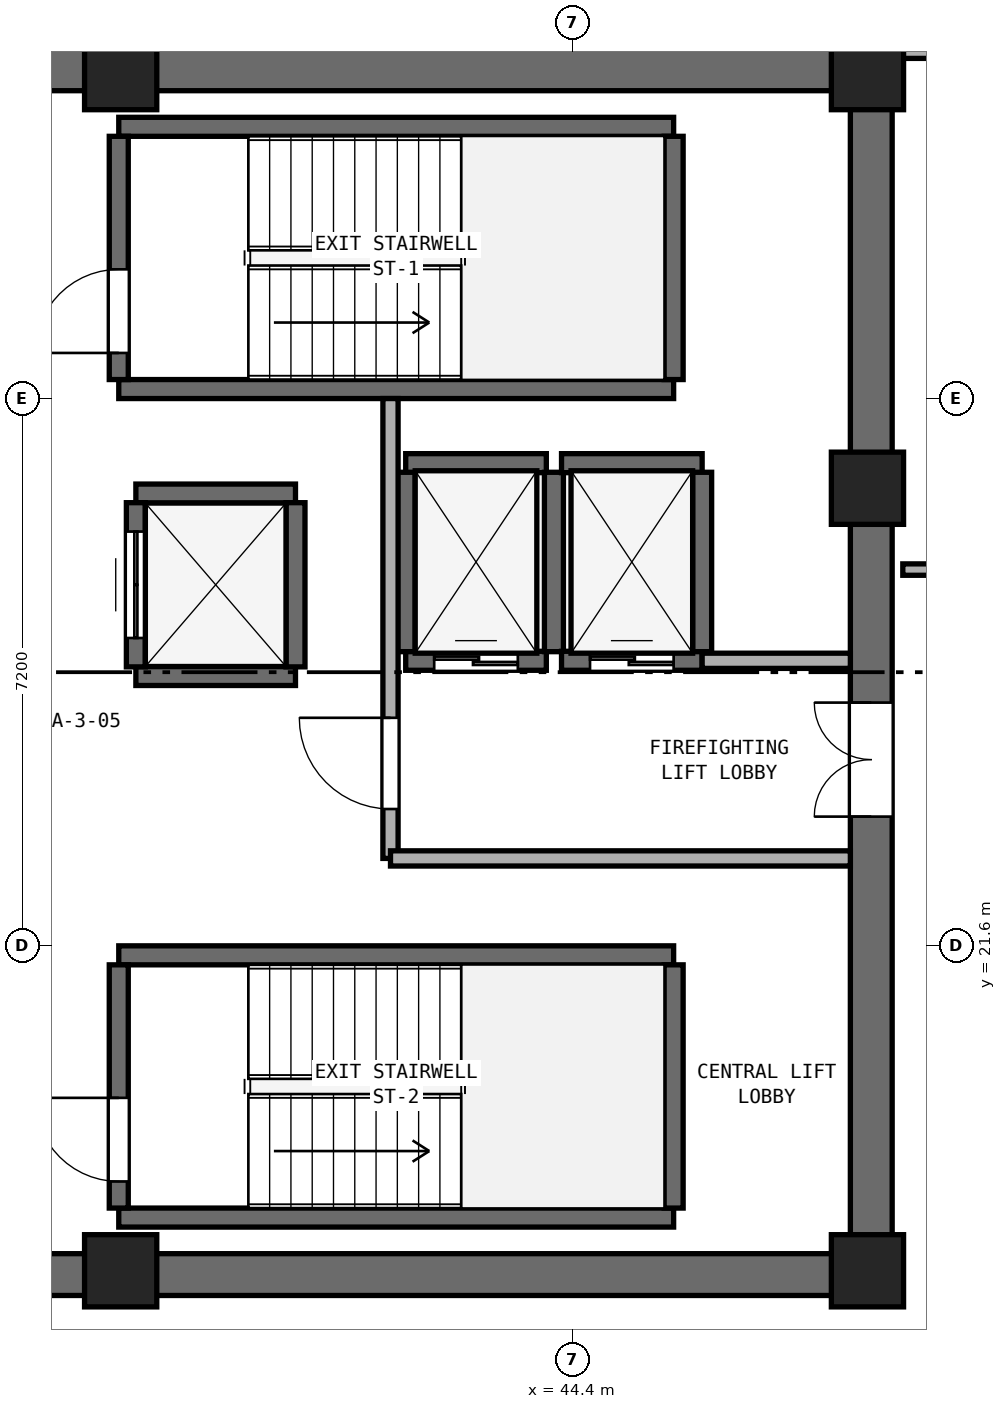
"""IFC4 building model, lengths in metres.
Left out: names, types, materials, properties, quantities, classifications, styles, units other than length and angle.
Written with IfcOpenShell. Run it as: python <this file> out.ifc"""

import sys

from ifc_helpers import new_model, si_unit, direction, frame, frame_2d, origin, origin_2d, place, context, subcontext, project, spatial, rectangle, extrude, element, fill, save


model = new_model("IFC4")
c1 = context("Model", 3, precision=1e-05, world=origin(), true_north=direction((0.0, 1.0)))
c2 = subcontext(c1, "Body", "Model", "MODEL_VIEW")
j1 = project(units=[si_unit("LENGTHUNIT", "METRE"), si_unit("PLANEANGLEUNIT", "RADIAN")], contexts=[c1])
p1 = place(None, origin())
s1 = spatial("IfcSite", under=j1, at=p1, CompositionType="ELEMENT")
p2 = place(p1, origin())
s2 = spatial("IfcBuilding", under=s1, at=p2, CompositionType="ELEMENT")
p3 = place(p2, frame((0.0, 0.0, 182.0)))
s3 = spatial("IfcBuildingStorey", under=s2, at=p3, CompositionType="ELEMENT", Elevation=182.0)
for number, where, z_axis, x_axis in (
    (1, (25.4, 17.275, 0.0), (0.0, 0.0, 1.0), (1.0, 0.0, 0.0)),
    (2, (25.4, 33.125, 0.0), (0.0, 0.0, 1.0), (1.0, 0.0, 0.0)),
):
    element("IfcWall", number, at=place(p3, frame(where, z_axis=z_axis, x_axis=x_axis)), inside=s3, PredefinedType="SHEAR", context=c2, shape_type="SweptSolid", body=[
        extrude(rectangle(XDim=23.2, YDim=0.55, at=frame_2d((11.6, 0.0))), origin(), (0.0, 0.0, 1.0), 3.54),
    ])
p4 = place(p3, frame((48.325, 17.55, 0.0), z_axis=(0.0, 0.0, 1.0), x_axis=(0.0, 1.0, 0.0)))
e3 = element("IfcWall", 3, at=p4, inside=s3, PredefinedType="SHEAR", context=c2, shape_type="SweptSolid", body=[
    extrude(rectangle(XDim=15.3, YDim=0.55, at=frame_2d((7.65, 0.0))), origin(), (0.0, 0.0, 1.0), 3.54),
])
p5 = place(p4, frame((5.75, 0.0, 0.0)))
e4 = element("IfcOpeningElement", 4, at=p5, cuts=e3, PredefinedType="OPENING", context=c2, shape_type="SweptSolid", body=[
    extrude(rectangle(XDim=1.5, YDim=2.15, at=frame_2d((0.75, 1.075))), frame((0.0, 0.285, 0.0), z_axis=(0.0, -1.0, 0.0), x_axis=(1.0, 0.0, 0.0)), (0.0, 0.0, 1.0), 0.57),
])
for number, where, z_axis, x_axis in (
    (5, (38.45, 17.325, 0.0), (0.0, 0.0, 1.0), (1.0, 0.0, 0.0)),
    (6, (48.275, 17.325, 0.0), (0.0, 0.0, 1.0), (1.0, 0.0, 0.0)),
    (7, (48.275, 27.62, 0.0), (0.0, 0.0, 1.0), (1.0, 0.0, 0.0)),
    (8, (48.275, 33.075, 0.0), (0.0, 0.0, 1.0), (1.0, 0.0, 0.0)),
    (9, (38.45, 33.075, 0.0), (0.0, 0.0, 1.0), (1.0, 0.0, 0.0)),
):
    element("IfcColumn", number, at=place(p3, frame(where, z_axis=z_axis, x_axis=x_axis)), inside=s3, PredefinedType="PILASTER", context=c2, shape_type="SweptSolid", body=[
        extrude(rectangle(XDim=0.95, YDim=0.95, at=origin_2d()), origin(), (0.0, 0.0, 1.0), 3.8),
    ])
for number, where, z_axis, x_axis in (
    (10, (38.425, 28.925, 0.0), (0.0, 0.0, 1.0), (1.0, 0.0, 0.0)),
    (11, (38.425, 32.375, 0.0), (0.0, 0.0, 1.0), (1.0, 0.0, 0.0)),
):
    element("IfcWall", number, at=place(p3, frame(where, z_axis=z_axis, x_axis=x_axis)), inside=s3, PredefinedType="SHEAR", context=c2, shape_type="SweptSolid", body=[
        extrude(rectangle(XDim=7.3, YDim=0.25, at=frame_2d((3.65, 0.0))), origin(), (0.0, 0.0, 1.0), 3.54),
    ])
p6 = place(p3, frame((38.425, 29.05, 0.0), z_axis=(0.0, 0.0, 1.0), x_axis=(0.0, 1.0, 0.0)))
e12 = element("IfcWall", 12, at=p6, inside=s3, PredefinedType="SHEAR", context=c2, shape_type="SweptSolid", body=[
    extrude(rectangle(XDim=3.2, YDim=0.25, at=frame_2d((1.6, 0.0))), origin(), (0.0, 0.0, 1.0), 3.54),
])
p7 = place(p6, frame((0.35, 0.0, 0.0)))
e13 = element("IfcOpeningElement", 13, at=p7, cuts=e12, PredefinedType="OPENING", context=c2, shape_type="SweptSolid", body=[
    extrude(rectangle(XDim=1.1, YDim=2.15, at=frame_2d((0.55, 1.075))), frame((0.0, 0.135, 0.0), z_axis=(0.0, -1.0, 0.0), x_axis=(1.0, 0.0, 0.0)), (0.0, 0.0, 1.0), 0.27),
])
p8 = place(p3, frame((45.725, 29.05, 0.0), z_axis=(0.0, 0.0, 1.0), x_axis=(0.0, 1.0, 0.0)))
e14 = element("IfcWall", 14, at=p8, inside=s3, PredefinedType="SHEAR", context=c2, shape_type="SweptSolid", body=[
    extrude(rectangle(XDim=3.2, YDim=0.25, at=frame_2d((1.6, 0.0))), origin(), (0.0, 0.0, 1.0), 3.54),
])
for number, where, z_axis, x_axis in (
    (15, (38.425, 18.025, 0.0), (0.0, 0.0, 1.0), (1.0, 0.0, 0.0)),
    (16, (38.425, 21.475, 0.0), (0.0, 0.0, 1.0), (1.0, 0.0, 0.0)),
):
    element("IfcWall", number, at=place(p3, frame(where, z_axis=z_axis, x_axis=x_axis)), inside=s3, PredefinedType="SHEAR", context=c2, shape_type="SweptSolid", body=[
        extrude(rectangle(XDim=7.3, YDim=0.25, at=frame_2d((3.65, 0.0))), origin(), (0.0, 0.0, 1.0), 3.54),
    ])
p9 = place(p3, frame((38.425, 18.15, 0.0), z_axis=(0.0, 0.0, 1.0), x_axis=(0.0, 1.0, 0.0)))
e17 = element("IfcWall", 17, at=p9, inside=s3, PredefinedType="SHEAR", context=c2, shape_type="SweptSolid", body=[
    extrude(rectangle(XDim=3.2, YDim=0.25, at=frame_2d((1.6, 0.0))), origin(), (0.0, 0.0, 1.0), 3.54),
])
p10 = place(p9, frame((0.35, 0.0, 0.0)))
e18 = element("IfcOpeningElement", 18, at=p10, cuts=e17, PredefinedType="OPENING", context=c2, shape_type="SweptSolid", body=[
    extrude(rectangle(XDim=1.1, YDim=2.15, at=frame_2d((0.55, 1.075))), frame((0.0, 0.135, 0.0), z_axis=(0.0, -1.0, 0.0), x_axis=(1.0, 0.0, 0.0)), (0.0, 0.0, 1.0), 0.27),
])
p11 = place(p3, frame((45.725, 18.15, 0.0), z_axis=(0.0, 0.0, 1.0), x_axis=(0.0, 1.0, 0.0)))
e19 = element("IfcWall", 19, at=p11, inside=s3, PredefinedType="SHEAR", context=c2, shape_type="SweptSolid", body=[
    extrude(rectangle(XDim=3.2, YDim=0.25, at=frame_2d((1.6, 0.0))), origin(), (0.0, 0.0, 1.0), 3.54),
])
p12 = place(p3, frame((42.2, 25.35, 0.0), z_axis=(0.0, 0.0, 1.0), x_axis=(1.0, 0.0, 0.0)))
e20 = element("IfcWall", 20, at=p12, inside=s3, PredefinedType="SHEAR", context=c2, shape_type="SweptSolid", body=[
    extrude(rectangle(XDim=1.85, YDim=0.25, at=frame_2d((0.925, 0.0))), origin(), (0.0, 0.0, 1.0), 3.54),
])
p13 = place(p12, frame((0.375, 0.0, 0.0)))
e21 = element("IfcOpeningElement", 21, at=p13, cuts=e20, PredefinedType="OPENING", context=c2, shape_type="SweptSolid", body=[
    extrude(rectangle(XDim=1.1, YDim=2.15, at=frame_2d((0.55, 1.075))), frame((0.0, 0.135, 0.0), z_axis=(0.0, -1.0, 0.0), x_axis=(1.0, 0.0, 0.0)), (0.0, 0.0, 1.0), 0.27),
])
p14 = place(p3, frame((42.2, 27.95, 0.0), z_axis=(0.0, 0.0, 1.0), x_axis=(1.0, 0.0, 0.0)))
e22 = element("IfcWall", 22, at=p14, inside=s3, PredefinedType="SHEAR", context=c2, shape_type="SweptSolid", body=[
    extrude(rectangle(XDim=1.85, YDim=0.25, at=frame_2d((0.925, 0.0))), origin(), (0.0, 0.0, 1.0), 3.54),
])
for number, where, z_axis, x_axis in (
    (23, (42.2, 25.47, 0.0), (0.0, 0.0, 1.0), (0.0, 1.0, 0.0)),
    (24, (44.15, 25.47, 0.0), (0.0, 0.0, 1.0), (0.0, 1.0, 0.0)),
):
    element("IfcWall", number, at=place(p3, frame(where, z_axis=z_axis, x_axis=x_axis)), inside=s3, PredefinedType="SHEAR", context=c2, shape_type="SweptSolid", body=[
        extrude(rectangle(XDim=2.36, YDim=0.25, at=frame_2d((1.18, 0.0))), origin(), (0.0, 0.0, 1.0), 3.54),
    ])
p15 = place(p3, frame((44.25, 25.35, 0.0), z_axis=(0.0, 0.0, 1.0), x_axis=(1.0, 0.0, 0.0)))
e25 = element("IfcWall", 25, at=p15, inside=s3, PredefinedType="SHEAR", context=c2, shape_type="SweptSolid", body=[
    extrude(rectangle(XDim=1.85, YDim=0.25, at=frame_2d((0.925, 0.0))), origin(), (0.0, 0.0, 1.0), 3.54),
])
p16 = place(p15, frame((0.375, 0.0, 0.0)))
e26 = element("IfcOpeningElement", 26, at=p16, cuts=e25, PredefinedType="OPENING", context=c2, shape_type="SweptSolid", body=[
    extrude(rectangle(XDim=1.1, YDim=2.15, at=frame_2d((0.55, 1.075))), frame((0.0, 0.135, 0.0), z_axis=(0.0, -1.0, 0.0), x_axis=(1.0, 0.0, 0.0)), (0.0, 0.0, 1.0), 0.27),
])
p17 = place(p3, frame((44.25, 27.95, 0.0), z_axis=(0.0, 0.0, 1.0), x_axis=(1.0, 0.0, 0.0)))
e27 = element("IfcWall", 27, at=p17, inside=s3, PredefinedType="SHEAR", context=c2, shape_type="SweptSolid", body=[
    extrude(rectangle(XDim=1.85, YDim=0.25, at=frame_2d((0.925, 0.0))), origin(), (0.0, 0.0, 1.0), 3.54),
])
p18 = place(p3, frame((46.1, 25.47, 0.0), z_axis=(0.0, 0.0, 1.0), x_axis=(0.0, 1.0, 0.0)))
e28 = element("IfcWall", 28, at=p18, inside=s3, PredefinedType="SHEAR", context=c2, shape_type="SweptSolid", body=[
    extrude(rectangle(XDim=2.36, YDim=0.25, at=frame_2d((1.18, 0.0))), origin(), (0.0, 0.0, 1.0), 3.54),
])
for number, where, z_axis, x_axis in (
    (29, (38.65, 25.15, 0.0), (0.0, 0.0, 1.0), (1.0, 0.0, 0.0)),
    (30, (38.65, 27.55, 0.0), (0.0, 0.0, 1.0), (1.0, 0.0, 0.0)),
):
    element("IfcWall", number, at=place(p3, frame(where, z_axis=z_axis, x_axis=x_axis)), inside=s3, PredefinedType="SHEAR", context=c2, shape_type="SweptSolid", body=[
        extrude(rectangle(XDim=2.1, YDim=0.25, at=frame_2d((1.05, 0.0))), origin(), (0.0, 0.0, 1.0), 3.54),
    ])
p19 = place(p3, frame((38.65, 25.27, 0.0), z_axis=(0.0, 0.0, 1.0), x_axis=(0.0, 1.0, 0.0)))
e31 = element("IfcWall", 31, at=p19, inside=s3, PredefinedType="SHEAR", context=c2, shape_type="SweptSolid", body=[
    extrude(rectangle(XDim=2.16, YDim=0.25, at=frame_2d((1.08, 0.0))), origin(), (0.0, 0.0, 1.0), 3.54),
])
p20 = place(p19, frame((0.38, 0.0, 0.0)))
e32 = element("IfcOpeningElement", 32, at=p20, cuts=e31, PredefinedType="OPENING", context=c2, shape_type="SweptSolid", body=[
    extrude(rectangle(XDim=1.4, YDim=2.2, at=frame_2d((0.7, 1.1))), frame((0.0, 0.135, 0.0), z_axis=(0.0, -1.0, 0.0), x_axis=(1.0, 0.0, 0.0)), (0.0, 0.0, 1.0), 0.27),
])
p21 = place(p3, frame((40.75, 25.27, 0.0), z_axis=(0.0, 0.0, 1.0), x_axis=(0.0, 1.0, 0.0)))
e33 = element("IfcWall", 33, at=p21, inside=s3, PredefinedType="SHEAR", context=c2, shape_type="SweptSolid", body=[
    extrude(rectangle(XDim=2.16, YDim=0.25, at=frame_2d((1.08, 0.0))), origin(), (0.0, 0.0, 1.0), 3.54),
])
p22 = place(p3, frame((42.0, 22.75, 0.0), z_axis=(0.0, 0.0, 1.0), x_axis=(0.0, 1.0, 0.0)))
e34 = element("IfcWall", 34, at=p22, inside=s3, PredefinedType="SOLIDWALL", context=c2, shape_type="SweptSolid", body=[
    extrude(rectangle(XDim=6.05, YDim=0.2, at=frame_2d((3.025, 0.0))), origin(), (0.0, 0.0, 1.0), 3.54),
])
p23 = place(p22, frame((0.65, 0.0, 0.0)))
e35 = element("IfcOpeningElement", 35, at=p23, cuts=e34, PredefinedType="OPENING", context=c2, shape_type="SweptSolid", body=[
    extrude(rectangle(XDim=1.2, YDim=2.15, at=frame_2d((0.6, 1.075))), frame((0.0, 0.11, 0.0), z_axis=(0.0, -1.0, 0.0), x_axis=(1.0, 0.0, 0.0)), (0.0, 0.0, 1.0), 0.22),
])
p24 = place(p3, frame((42.0, 22.75, 0.0), z_axis=(0.0, 0.0, 1.0), x_axis=(1.0, 0.0, 0.0)))
e36 = element("IfcWall", 36, at=p24, inside=s3, PredefinedType="SOLIDWALL", context=c2, shape_type="SweptSolid", body=[
    extrude(rectangle(XDim=6.05, YDim=0.2, at=frame_2d((3.025, 0.0))), origin(), (0.0, 0.0, 1.0), 3.54),
])
p25 = place(p3, frame((46.1, 25.35, 0.0), z_axis=(0.0, 0.0, 1.0), x_axis=(1.0, 0.0, 0.0)))
e37 = element("IfcWall", 37, at=p25, inside=s3, PredefinedType="SOLIDWALL", context=c2, shape_type="SweptSolid", body=[
    extrude(rectangle(XDim=1.95, YDim=0.2, at=frame_2d((0.975, 0.0))), origin(), (0.0, 0.0, 1.0), 3.54),
])
p26 = place(p3, frame((48.74, 26.55, 0.0), z_axis=(0.0, 0.0, 1.0), x_axis=(1.0, 0.0, 0.0)))
e38 = element("IfcWall", 38, at=p26, inside=s3, PredefinedType="PARTITIONING", context=c2, shape_type="SweptSolid", body=[
    extrude(rectangle(XDim=12.855, YDim=0.15, at=frame_2d((6.427, 0.0))), origin(), (0.0, 0.0, 1.0), 3.54),
])
p27 = place(p26, frame((5.927, 0.0, 0.0)))
e39 = element("IfcOpeningElement", 39, at=p27, cuts=e38, PredefinedType="OPENING", context=c2, shape_type="SweptSolid", body=[
    extrude(rectangle(XDim=1.0, YDim=2.12, at=frame_2d((0.5, 1.06))), frame((0.0, 0.085, 0.0), z_axis=(0.0, -1.0, 0.0), x_axis=(1.0, 0.0, 0.0)), (0.0, 0.0, 1.0), 0.17),
])
p28 = place(p3, frame((48.74, 33.35, 0.0), z_axis=(0.0, 0.0, 1.0), x_axis=(1.0, 0.0, 0.0)))
e40 = element("IfcWall", 40, at=p28, inside=s3, PredefinedType="PARTITIONING", context=c2, shape_type="SweptSolid", body=[
    extrude(rectangle(XDim=12.855, YDim=0.15, at=frame_2d((6.427, 0.0))), origin(), (0.0, 0.0, 1.0), 2.923),
])
p29 = place(p7, origin())
e41 = element("IfcDoor", 41, at=p29, inside=s3, OperationType="SINGLE_SWING_LEFT", PredefinedType="DOOR", context=c2, shape_type="SweptSolid", body=[
    extrude(rectangle(XDim=1.1, YDim=2.15, at=frame_2d((0.55, 1.075))), frame((0.0, 0.025, 0.0), z_axis=(0.0, -1.0, 0.0), x_axis=(1.0, 0.0, 0.0)), (0.0, 0.0, 1.0), 0.05),
])
fill(e13, e41)
p30 = place(p10, origin())
e42 = element("IfcDoor", 42, at=p30, inside=s3, OperationType="SINGLE_SWING_RIGHT", PredefinedType="DOOR", context=c2, shape_type="SweptSolid", body=[
    extrude(rectangle(XDim=1.1, YDim=2.15, at=frame_2d((0.55, 1.075))), frame((0.0, 0.025, 0.0), z_axis=(0.0, -1.0, 0.0), x_axis=(1.0, 0.0, 0.0)), (0.0, 0.0, 1.0), 0.05),
])
fill(e18, e42)
p31 = place(p13, origin())
e43 = element("IfcDoor", 43, at=p31, inside=s3, OperationType="DOUBLE_DOOR_SLIDING", PredefinedType="DOOR", context=c2, shape_type="SweptSolid", body=[
    extrude(rectangle(XDim=1.1, YDim=2.15, at=frame_2d((0.55, 1.075))), frame((0.0, 0.025, 0.0), z_axis=(0.0, -1.0, 0.0), x_axis=(1.0, 0.0, 0.0)), (0.0, 0.0, 1.0), 0.05),
])
fill(e21, e43)
p32 = place(p16, origin())
e44 = element("IfcDoor", 44, at=p32, inside=s3, OperationType="DOUBLE_DOOR_SLIDING", PredefinedType="DOOR", context=c2, shape_type="SweptSolid", body=[
    extrude(rectangle(XDim=1.1, YDim=2.15, at=frame_2d((0.55, 1.075))), frame((0.0, 0.025, 0.0), z_axis=(0.0, -1.0, 0.0), x_axis=(1.0, 0.0, 0.0)), (0.0, 0.0, 1.0), 0.05),
])
fill(e26, e44)
p33 = place(p20, origin())
e45 = element("IfcDoor", 45, at=p33, inside=s3, OperationType="DOUBLE_DOOR_SLIDING", PredefinedType="DOOR", context=c2, shape_type="SweptSolid", body=[
    extrude(rectangle(XDim=1.4, YDim=2.2, at=frame_2d((0.7, 1.1))), frame((0.0, 0.025, 0.0), z_axis=(0.0, -1.0, 0.0), x_axis=(1.0, 0.0, 0.0)), (0.0, 0.0, 1.0), 0.05),
])
fill(e32, e45)
p34 = place(p23, origin())
e46 = element("IfcDoor", 46, at=p34, inside=s3, OperationType="SINGLE_SWING_RIGHT", PredefinedType="DOOR", context=c2, shape_type="SweptSolid", body=[
    extrude(rectangle(XDim=1.2, YDim=2.15, at=frame_2d((0.6, 1.075))), frame((0.0, 0.025, 0.0), z_axis=(0.0, -1.0, 0.0), x_axis=(1.0, 0.0, 0.0)), (0.0, 0.0, 1.0), 0.05),
])
fill(e35, e46)
p35 = place(p5, origin())
e47 = element("IfcDoor", 47, at=p35, inside=s3, OperationType="DOUBLE_DOOR_SINGLE_SWING", PredefinedType="DOOR", context=c2, shape_type="SweptSolid", body=[
    extrude(rectangle(XDim=1.5, YDim=2.15, at=frame_2d((0.75, 1.075))), frame((0.0, 0.025, 0.0), z_axis=(0.0, -1.0, 0.0), x_axis=(1.0, 0.0, 0.0)), (0.0, 0.0, 1.0), 0.05),
])
fill(e4, e47)
save(model, sys.argv[1])
